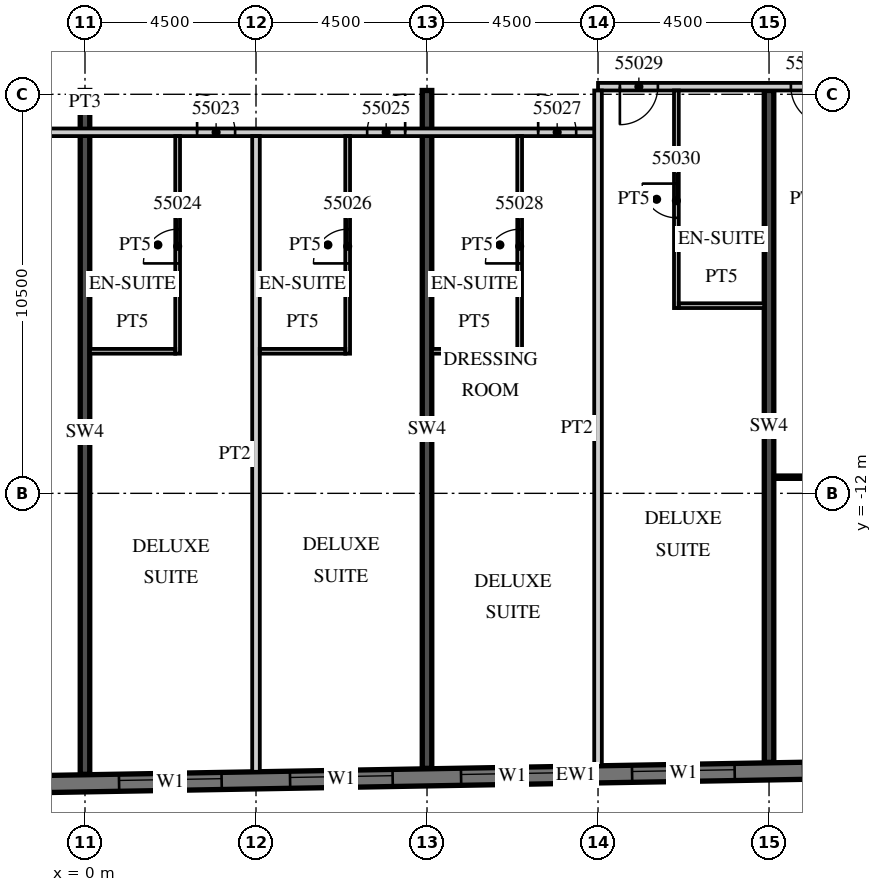
"""IFC4 building model, lengths in metres.
Left out: names, types, materials, properties, quantities, classifications, styles, units other than length and angle.
Written with IfcOpenShell. Run it as: python <this file> out.ifc"""

import sys

from ifc_helpers import new_model, si_unit, direction, frame, frame_2d, origin, place, context, subcontext, project, spatial, rectangle, extrude, element, fill, save


model = new_model("IFC4")
c1 = context("Model", 3, precision=1e-05, world=origin(), true_north=direction((0.0, 1.0)))
c2 = subcontext(c1, "Body", "Model", "MODEL_VIEW")
j1 = project(units=[si_unit("LENGTHUNIT", "METRE"), si_unit("PLANEANGLEUNIT", "RADIAN")], contexts=[c1])
p1 = place(None, origin())
s1 = spatial("IfcSite", under=j1, at=p1, CompositionType="ELEMENT")
p2 = place(p1, origin())
s2 = spatial("IfcBuilding", under=s1, at=p2, CompositionType="ELEMENT")
p3 = place(p2, frame((0.0, 0.0, 227.6)))
s3 = spatial("IfcBuildingStorey", under=s2, at=p3, CompositionType="ELEMENT", Elevation=227.6)
p4 = place(p3, frame((0.0, -19.393, 0.0), z_axis=(0.0, 0.0, 1.0), x_axis=(0.0, 1.0, 0.0)))
e1 = element("IfcWall", 1, at=p4, inside=s3, PredefinedType="SHEAR", context=c2, shape_type="SweptSolid", body=[
    extrude(rectangle(XDim=17.993, YDim=0.25, at=frame_2d((8.997, 0.0))), origin(), (0.0, 0.0, 1.0), 3.3),
])
p5 = place(p3, frame((9.0, -19.236, 0.0), z_axis=(0.0, 0.0, 1.0), x_axis=(0.0, 1.0, 0.0)))
e2 = element("IfcWall", 2, at=p5, inside=s3, PredefinedType="SHEAR", context=c2, shape_type="SweptSolid", body=[
    extrude(rectangle(XDim=17.836, YDim=0.25, at=frame_2d((8.918, 0.0))), origin(), (0.0, 0.0, 1.0), 3.3),
])
p6 = place(p3, frame((18.0, -19.079, 0.0), z_axis=(0.0, 0.0, 1.0), x_axis=(0.0, 1.0, 0.0)))
e3 = element("IfcWall", 3, at=p6, inside=s3, PredefinedType="SHEAR", context=c2, shape_type="SweptSolid", body=[
    extrude(rectangle(XDim=17.679, YDim=0.25, at=frame_2d((8.84, 0.0))), origin(), (0.0, 0.0, 1.0), 3.3),
])
p7 = place(p3, frame((-13.504, -19.866, 0.0), z_axis=(0.0, 0.0, 1.0), x_axis=(0.999847672978, 0.017453676992, 0.0)))
e4 = element("IfcWall", 4, at=p7, inside=s3, PredefinedType="SOLIDWALL", context=c2, shape_type="SweptSolid", body=[
    extrude(rectangle(XDim=52.86, YDim=0.45, at=frame_2d((26.43, 0.0))), origin(), (0.0, 0.0, 1.0), 3.02),
])
p8 = place(p7, frame((0.9, 0.0, 0.45)))
e5 = element("IfcOpeningElement", 5, at=p8, cuts=e4, PredefinedType="OPENING", context=c2, shape_type="SweptSolid", body=[
    extrude(rectangle(XDim=2.7, YDim=2.25, at=frame_2d((1.35, 1.125))), frame((0.0, 0.235, 0.0), z_axis=(0.0, -1.0, 0.0), x_axis=(1.0, 0.0, 0.0)), (0.0, 0.0, 1.0), 0.47),
])
p9 = place(p7, frame((5.401, 0.0, 0.45)))
e6 = element("IfcOpeningElement", 6, at=p9, cuts=e4, PredefinedType="OPENING", context=c2, shape_type="SweptSolid", body=[
    extrude(rectangle(XDim=2.7, YDim=2.25, at=frame_2d((1.35, 1.125))), frame((0.0, 0.235, 0.0), z_axis=(0.0, -1.0, 0.0), x_axis=(1.0, 0.0, 0.0)), (0.0, 0.0, 1.0), 0.47),
])
p10 = place(p7, frame((9.902, 0.0, 0.45)))
e7 = element("IfcOpeningElement", 7, at=p10, cuts=e4, PredefinedType="OPENING", context=c2, shape_type="SweptSolid", body=[
    extrude(rectangle(XDim=2.7, YDim=2.25, at=frame_2d((1.35, 1.125))), frame((0.0, 0.235, 0.0), z_axis=(0.0, -1.0, 0.0), x_axis=(1.0, 0.0, 0.0)), (0.0, 0.0, 1.0), 0.47),
])
p11 = place(p7, frame((14.402, 0.0, 0.45)))
e8 = element("IfcOpeningElement", 8, at=p11, cuts=e4, PredefinedType="OPENING", context=c2, shape_type="SweptSolid", body=[
    extrude(rectangle(XDim=2.7, YDim=2.25, at=frame_2d((1.35, 1.125))), frame((0.0, 0.235, 0.0), z_axis=(0.0, -1.0, 0.0), x_axis=(1.0, 0.0, 0.0)), (0.0, 0.0, 1.0), 0.47),
])
p12 = place(p7, frame((18.903, 0.0, 0.45)))
e9 = element("IfcOpeningElement", 9, at=p12, cuts=e4, PredefinedType="OPENING", context=c2, shape_type="SweptSolid", body=[
    extrude(rectangle(XDim=2.7, YDim=2.25, at=frame_2d((1.35, 1.125))), frame((0.0, 0.235, 0.0), z_axis=(0.0, -1.0, 0.0), x_axis=(1.0, 0.0, 0.0)), (0.0, 0.0, 1.0), 0.47),
])
p13 = place(p7, frame((23.404, 0.0, 0.45)))
e10 = element("IfcOpeningElement", 10, at=p13, cuts=e4, PredefinedType="OPENING", context=c2, shape_type="SweptSolid", body=[
    extrude(rectangle(XDim=2.7, YDim=2.25, at=frame_2d((1.35, 1.125))), frame((0.0, 0.235, 0.0), z_axis=(0.0, -1.0, 0.0), x_axis=(1.0, 0.0, 0.0)), (0.0, 0.0, 1.0), 0.47),
])
p14 = place(p7, frame((27.904, 0.0, 0.45)))
e11 = element("IfcOpeningElement", 11, at=p14, cuts=e4, PredefinedType="OPENING", context=c2, shape_type="SweptSolid", body=[
    extrude(rectangle(XDim=2.7, YDim=2.25, at=frame_2d((1.35, 1.125))), frame((0.0, 0.235, 0.0), z_axis=(0.0, -1.0, 0.0), x_axis=(1.0, 0.0, 0.0)), (0.0, 0.0, 1.0), 0.47),
])
p15 = place(p7, frame((32.405, 0.0, 0.45)))
e12 = element("IfcOpeningElement", 12, at=p15, cuts=e4, PredefinedType="OPENING", context=c2, shape_type="SweptSolid", body=[
    extrude(rectangle(XDim=2.7, YDim=2.25, at=frame_2d((1.35, 1.125))), frame((0.0, 0.235, 0.0), z_axis=(0.0, -1.0, 0.0), x_axis=(1.0, 0.0, 0.0)), (0.0, 0.0, 1.0), 0.47),
])
p16 = place(p7, frame((36.906, 0.0, 0.45)))
e13 = element("IfcOpeningElement", 13, at=p16, cuts=e4, PredefinedType="OPENING", context=c2, shape_type="SweptSolid", body=[
    extrude(rectangle(XDim=2.7, YDim=2.25, at=frame_2d((1.35, 1.125))), frame((0.0, 0.235, 0.0), z_axis=(0.0, -1.0, 0.0), x_axis=(1.0, 0.0, 0.0)), (0.0, 0.0, 1.0), 0.47),
])
p17 = place(p7, frame((41.406, 0.0, 0.45)))
e14 = element("IfcOpeningElement", 14, at=p17, cuts=e4, PredefinedType="OPENING", context=c2, shape_type="SweptSolid", body=[
    extrude(rectangle(XDim=2.7, YDim=2.25, at=frame_2d((1.35, 1.125))), frame((0.0, 0.235, 0.0), z_axis=(0.0, -1.0, 0.0), x_axis=(1.0, 0.0, 0.0)), (0.0, 0.0, 1.0), 0.47),
])
p18 = place(p7, frame((45.907, 0.0, 0.45)))
e15 = element("IfcOpeningElement", 15, at=p18, cuts=e4, PredefinedType="OPENING", context=c2, shape_type="SweptSolid", body=[
    extrude(rectangle(XDim=2.7, YDim=2.25, at=frame_2d((1.35, 1.125))), frame((0.0, 0.235, 0.0), z_axis=(0.0, -1.0, 0.0), x_axis=(1.0, 0.0, 0.0)), (0.0, 0.0, 1.0), 0.47),
])
p19 = place(p3, frame((-13.5, -2.5, 0.0), z_axis=(0.0, 0.0, 1.0), x_axis=(1.0, 0.0, 0.0)))
e16 = element("IfcWall", 16, at=p19, inside=s3, PredefinedType="PARTITIONING", context=c2, shape_type="SweptSolid", body=[
    extrude(rectangle(XDim=27.0, YDim=0.2, at=frame_2d((13.5, 0.0))), origin(), (0.0, 0.0, 1.0), 3.02),
])
p20 = place(p19, frame((2.925, 0.0, 0.0)))
e17 = element("IfcOpeningElement", 17, at=p20, cuts=e16, PredefinedType="OPENING", context=c2, shape_type="SweptSolid", body=[
    extrude(rectangle(XDim=1.0, YDim=2.1, at=frame_2d((0.5, 1.05))), frame((0.0, 0.11, 0.0), z_axis=(0.0, -1.0, 0.0), x_axis=(1.0, 0.0, 0.0)), (0.0, 0.0, 1.0), 0.22),
])
p21 = place(p19, frame((9.863, 0.0, 0.0)))
e18 = element("IfcOpeningElement", 18, at=p21, cuts=e16, PredefinedType="OPENING", context=c2, shape_type="SweptSolid", body=[
    extrude(rectangle(XDim=1.2, YDim=2.1, at=frame_2d((0.6, 1.05))), frame((0.0, 0.11, 0.0), z_axis=(0.0, -1.0, 0.0), x_axis=(1.0, 0.0, 0.0)), (0.0, 0.0, 1.0), 0.22),
])
p22 = place(p19, frame((16.45, 0.0, 0.0)))
e19 = element("IfcOpeningElement", 19, at=p22, cuts=e16, PredefinedType="OPENING", context=c2, shape_type="SweptSolid", body=[
    extrude(rectangle(XDim=1.0, YDim=2.1, at=frame_2d((0.5, 1.05))), frame((0.0, 0.11, 0.0), z_axis=(0.0, -1.0, 0.0), x_axis=(1.0, 0.0, 0.0)), (0.0, 0.0, 1.0), 0.22),
])
p23 = place(p19, frame((20.925, 0.0, 0.0)))
e20 = element("IfcOpeningElement", 20, at=p23, cuts=e16, PredefinedType="OPENING", context=c2, shape_type="SweptSolid", body=[
    extrude(rectangle(XDim=1.0, YDim=2.1, at=frame_2d((0.5, 1.05))), frame((0.0, 0.11, 0.0), z_axis=(0.0, -1.0, 0.0), x_axis=(1.0, 0.0, 0.0)), (0.0, 0.0, 1.0), 0.22),
])
p24 = place(p19, frame((25.425, 0.0, 0.0)))
e21 = element("IfcOpeningElement", 21, at=p24, cuts=e16, PredefinedType="OPENING", context=c2, shape_type="SweptSolid", body=[
    extrude(rectangle(XDim=1.0, YDim=2.1, at=frame_2d((0.5, 1.05))), frame((0.0, 0.11, 0.0), z_axis=(0.0, -1.0, 0.0), x_axis=(1.0, 0.0, 0.0)), (0.0, 0.0, 1.0), 0.22),
])
p25 = place(p3, frame((13.5, -1.3, 0.0), z_axis=(0.0, 0.0, 1.0), x_axis=(1.0, 0.0, 0.0)))
e22 = element("IfcWall", 22, at=p25, inside=s3, PredefinedType="PARTITIONING", context=c2, shape_type="SweptSolid", body=[
    extrude(rectangle(XDim=29.091, YDim=0.2, at=frame_2d((14.545, 0.0))), origin(), (0.0, 0.0, 1.0), 3.02),
])
p26 = place(p25, frame((0.575, 0.0, 0.0)))
e23 = element("IfcOpeningElement", 23, at=p26, cuts=e22, PredefinedType="OPENING", context=c2, shape_type="SweptSolid", body=[
    extrude(rectangle(XDim=1.0, YDim=2.1, at=frame_2d((0.5, 1.05))), frame((0.0, 0.11, 0.0), z_axis=(0.0, -1.0, 0.0), x_axis=(1.0, 0.0, 0.0)), (0.0, 0.0, 1.0), 0.22),
])
p27 = place(p25, frame((5.075, 0.0, 0.0)))
e24 = element("IfcOpeningElement", 24, at=p27, cuts=e22, PredefinedType="OPENING", context=c2, shape_type="SweptSolid", body=[
    extrude(rectangle(XDim=1.0, YDim=2.1, at=frame_2d((0.5, 1.05))), frame((0.0, 0.11, 0.0), z_axis=(0.0, -1.0, 0.0), x_axis=(1.0, 0.0, 0.0)), (0.0, 0.0, 1.0), 0.22),
])
p28 = place(p25, frame((9.55, 0.0, 0.0)))
e25 = element("IfcOpeningElement", 25, at=p28, cuts=e22, PredefinedType="OPENING", context=c2, shape_type="SweptSolid", body=[
    extrude(rectangle(XDim=1.0, YDim=2.1, at=frame_2d((0.5, 1.05))), frame((0.0, 0.11, 0.0), z_axis=(0.0, -1.0, 0.0), x_axis=(1.0, 0.0, 0.0)), (0.0, 0.0, 1.0), 0.22),
])
p29 = place(p25, frame((18.862, 0.0, 0.0)))
e26 = element("IfcOpeningElement", 26, at=p29, cuts=e22, PredefinedType="OPENING", context=c2, shape_type="SweptSolid", body=[
    extrude(rectangle(XDim=1.2, YDim=2.1, at=frame_2d((0.6, 1.05))), frame((0.0, 0.11, 0.0), z_axis=(0.0, -1.0, 0.0), x_axis=(1.0, 0.0, 0.0)), (0.0, 0.0, 1.0), 0.22),
])
p30 = place(p25, frame((23.075, 0.0, 0.0)))
e27 = element("IfcOpeningElement", 27, at=p30, cuts=e22, PredefinedType="OPENING", context=c2, shape_type="SweptSolid", body=[
    extrude(rectangle(XDim=1.0, YDim=2.1, at=frame_2d((0.5, 1.05))), frame((0.0, 0.11, 0.0), z_axis=(0.0, -1.0, 0.0), x_axis=(1.0, 0.0, 0.0)), (0.0, 0.0, 1.0), 0.22),
])
p31 = place(p25, frame((27.611, 0.0, 0.0)))
e28 = element("IfcOpeningElement", 28, at=p31, cuts=e22, PredefinedType="OPENING", context=c2, shape_type="SweptSolid", body=[
    extrude(rectangle(XDim=1.0, YDim=2.4, at=frame_2d((0.5, 1.2))), frame((0.0, 0.11, 0.0), z_axis=(0.0, -1.0, 0.0), x_axis=(1.0, 0.0, 0.0)), (0.0, 0.0, 1.0), 0.22),
])
p32 = place(p3, frame((4.5, -19.327, 0.0), z_axis=(0.0, 0.0, 1.0), x_axis=(0.0, 1.0, 0.0)))
e29 = element("IfcWall", 29, at=p32, inside=s3, PredefinedType="PARTITIONING", context=c2, shape_type="SweptSolid", body=[
    extrude(rectangle(XDim=16.727, YDim=0.2, at=frame_2d((8.363, 0.0))), origin(), (0.0, 0.0, 1.0), 3.02),
])
p33 = place(p3, frame((2.438, -8.325, 0.0), z_axis=(0.0, 0.0, 1.0), x_axis=(0.0, 1.0, 0.0)))
e30 = element("IfcWall", 30, at=p33, inside=s3, PredefinedType="PARTITIONING", context=c2, shape_type="SweptSolid", body=[
    extrude(rectangle(XDim=5.725, YDim=0.125, at=frame_2d((2.862, 0.0))), origin(), (0.0, 0.0, 1.0), 3.02),
])
p34 = place(p33, frame((2.375, 0.0, 0.0)))
e31 = element("IfcOpeningElement", 31, at=p34, cuts=e30, PredefinedType="OPENING", context=c2, shape_type="SweptSolid", body=[
    extrude(rectangle(XDim=0.9, YDim=2.1, at=frame_2d((0.45, 1.05))), frame((0.0, 0.073, 0.0), z_axis=(0.0, -1.0, 0.0), x_axis=(1.0, 0.0, 0.0)), (0.0, 0.0, 1.0), 0.145),
])
p35 = place(p3, frame((0.125, -8.262, 0.0), z_axis=(0.0, 0.0, 1.0), x_axis=(1.0, 0.0, 0.0)))
e32 = element("IfcWall", 32, at=p35, inside=s3, PredefinedType="PARTITIONING", context=c2, shape_type="SweptSolid", body=[
    extrude(rectangle(XDim=2.25, YDim=0.125, at=frame_2d((1.125, 0.0))), origin(), (0.0, 0.0, 1.0), 3.02),
])
p36 = place(p3, frame((6.912, -8.325, 0.0), z_axis=(0.0, 0.0, 1.0), x_axis=(0.0, 1.0, 0.0)))
e33 = element("IfcWall", 33, at=p36, inside=s3, PredefinedType="PARTITIONING", context=c2, shape_type="SweptSolid", body=[
    extrude(rectangle(XDim=5.725, YDim=0.125, at=frame_2d((2.862, 0.0))), origin(), (0.0, 0.0, 1.0), 3.02),
])
p37 = place(p36, frame((2.375, 0.0, 0.0)))
e34 = element("IfcOpeningElement", 34, at=p37, cuts=e33, PredefinedType="OPENING", context=c2, shape_type="SweptSolid", body=[
    extrude(rectangle(XDim=0.9, YDim=2.1, at=frame_2d((0.45, 1.05))), frame((0.0, 0.073, 0.0), z_axis=(0.0, -1.0, 0.0), x_axis=(1.0, 0.0, 0.0)), (0.0, 0.0, 1.0), 0.145),
])
p38 = place(p3, frame((4.6, -8.262, 0.0), z_axis=(0.0, 0.0, 1.0), x_axis=(1.0, 0.0, 0.0)))
e35 = element("IfcWall", 35, at=p38, inside=s3, PredefinedType="PARTITIONING", context=c2, shape_type="SweptSolid", body=[
    extrude(rectangle(XDim=2.25, YDim=0.125, at=frame_2d((1.125, 0.0))), origin(), (0.0, 0.0, 1.0), 3.02),
])
p39 = place(p3, frame((13.5, -19.17, 0.0), z_axis=(0.0, 0.0, 1.0), x_axis=(0.0, 1.0, 0.0)))
e36 = element("IfcWall", 36, at=p39, inside=s3, PredefinedType="PARTITIONING", context=c2, shape_type="SweptSolid", body=[
    extrude(rectangle(XDim=17.77, YDim=0.2, at=frame_2d((8.885, 0.0))), origin(), (0.0, 0.0, 1.0), 3.02),
])
p40 = place(p3, frame((11.438, -8.325, 0.0), z_axis=(0.0, 0.0, 1.0), x_axis=(0.0, 1.0, 0.0)))
e37 = element("IfcWall", 37, at=p40, inside=s3, PredefinedType="PARTITIONING", context=c2, shape_type="SweptSolid", body=[
    extrude(rectangle(XDim=5.725, YDim=0.125, at=frame_2d((2.862, 0.0))), origin(), (0.0, 0.0, 1.0), 3.02),
])
p41 = place(p40, frame((2.375, 0.0, 0.0)))
e38 = element("IfcOpeningElement", 38, at=p41, cuts=e37, PredefinedType="OPENING", context=c2, shape_type="SweptSolid", body=[
    extrude(rectangle(XDim=0.9, YDim=2.1, at=frame_2d((0.45, 1.05))), frame((0.0, 0.073, 0.0), z_axis=(0.0, -1.0, 0.0), x_axis=(1.0, 0.0, 0.0)), (0.0, 0.0, 1.0), 0.145),
])
p42 = place(p3, frame((9.125, -8.262, 0.0), z_axis=(0.0, 0.0, 1.0), x_axis=(1.0, 0.0, 0.0)))
e39 = element("IfcWall", 39, at=p42, inside=s3, PredefinedType="PARTITIONING", context=c2, shape_type="SweptSolid", body=[
    extrude(rectangle(XDim=2.25, YDim=0.125, at=frame_2d((1.125, 0.0))), origin(), (0.0, 0.0, 1.0), 3.02),
])
p43 = place(p3, frame((15.562, -7.125, 0.0), z_axis=(0.0, 0.0, 1.0), x_axis=(0.0, 1.0, 0.0)))
e40 = element("IfcWall", 40, at=p43, inside=s3, PredefinedType="PARTITIONING", context=c2, shape_type="SweptSolid", body=[
    extrude(rectangle(XDim=5.725, YDim=0.125, at=frame_2d((2.863, 0.0))), origin(), (0.0, 0.0, 1.0), 3.02),
])
p44 = place(p43, frame((2.375, 0.0, 0.0)))
e41 = element("IfcOpeningElement", 41, at=p44, cuts=e40, PredefinedType="OPENING", context=c2, shape_type="SweptSolid", body=[
    extrude(rectangle(XDim=0.9, YDim=2.1, at=frame_2d((0.45, 1.05))), frame((0.0, 0.073, 0.0), z_axis=(0.0, -1.0, 0.0), x_axis=(1.0, 0.0, 0.0)), (0.0, 0.0, 1.0), 0.145),
])
p45 = place(p3, frame((15.625, -7.062, 0.0), z_axis=(0.0, 0.0, 1.0), x_axis=(1.0, 0.0, 0.0)))
e42 = element("IfcWall", 42, at=p45, inside=s3, PredefinedType="PARTITIONING", context=c2, shape_type="SweptSolid", body=[
    extrude(rectangle(XDim=2.25, YDim=0.125, at=frame_2d((1.125, 0.0))), origin(), (0.0, 0.0, 1.0), 3.02),
])
p46 = place(p3, frame((18.125, -11.575, 0.0), z_axis=(0.0, 0.0, 1.0), x_axis=(1.0, 0.0, 0.0)))
e43 = element("IfcWall", 43, at=p46, inside=s3, PredefinedType="PARTITIONING", context=c2, shape_type="SweptSolid", body=[
    extrude(rectangle(XDim=4.275, YDim=0.1, at=frame_2d((2.137, 0.0))), origin(), (0.0, 0.0, 1.0), 3.02),
])
p47 = place(p46, frame((1.387, 0.0, 0.0)))
e44 = element("IfcOpeningElement", 44, at=p47, cuts=e43, PredefinedType="OPENING", context=c2, shape_type="SweptSolid", body=[
    extrude(rectangle(XDim=1.5, YDim=2.1, at=frame_2d((0.75, 1.05))), frame((0.0, 0.06, 0.0), z_axis=(0.0, -1.0, 0.0), x_axis=(1.0, 0.0, 0.0)), (0.0, 0.0, 1.0), 0.12),
])
p48 = place(p11, origin())
e45 = element("IfcWindow", 45, at=p48, inside=s3, PartitioningType="SINGLE_PANEL", PredefinedType="WINDOW", context=c2, shape_type="SweptSolid", body=[
    extrude(rectangle(XDim=2.7, YDim=2.25, at=frame_2d((1.35, 1.125))), frame((0.0, 0.09, 0.0), z_axis=(0.0, -1.0, 0.0), x_axis=(1.0, 0.0, 0.0)), (0.0, 0.0, 1.0), 0.06),
])
fill(e8, e45)
p49 = place(p12, origin())
e46 = element("IfcWindow", 46, at=p49, inside=s3, PartitioningType="SINGLE_PANEL", PredefinedType="WINDOW", context=c2, shape_type="SweptSolid", body=[
    extrude(rectangle(XDim=2.7, YDim=2.25, at=frame_2d((1.35, 1.125))), frame((0.0, 0.09, 0.0), z_axis=(0.0, -1.0, 0.0), x_axis=(1.0, 0.0, 0.0)), (0.0, 0.0, 1.0), 0.06),
])
fill(e9, e46)
p50 = place(p13, origin())
e47 = element("IfcWindow", 47, at=p50, inside=s3, PartitioningType="SINGLE_PANEL", PredefinedType="WINDOW", context=c2, shape_type="SweptSolid", body=[
    extrude(rectangle(XDim=2.7, YDim=2.25, at=frame_2d((1.35, 1.125))), frame((0.0, 0.09, 0.0), z_axis=(0.0, -1.0, 0.0), x_axis=(1.0, 0.0, 0.0)), (0.0, 0.0, 1.0), 0.06),
])
fill(e10, e47)
p51 = place(p14, origin())
e48 = element("IfcWindow", 48, at=p51, inside=s3, PartitioningType="SINGLE_PANEL", PredefinedType="WINDOW", context=c2, shape_type="SweptSolid", body=[
    extrude(rectangle(XDim=2.7, YDim=2.25, at=frame_2d((1.35, 1.125))), frame((0.0, 0.09, 0.0), z_axis=(0.0, -1.0, 0.0), x_axis=(1.0, 0.0, 0.0)), (0.0, 0.0, 1.0), 0.06),
])
fill(e11, e48)
p52 = place(p22, origin())
e49 = element("IfcDoor", 49, at=p52, inside=s3, OperationType="SINGLE_SWING_LEFT", PredefinedType="DOOR", context=c2, shape_type="SweptSolid", body=[
    extrude(rectangle(XDim=1.0, YDim=2.1, at=frame_2d((0.5, 1.05))), frame((0.0, 0.025, 0.0), z_axis=(0.0, -1.0, 0.0), x_axis=(1.0, 0.0, 0.0)), (0.0, 0.0, 1.0), 0.05),
])
fill(e19, e49)
p53 = place(p34, origin())
e50 = element("IfcDoor", 50, at=p53, inside=s3, OperationType="SINGLE_SWING_LEFT", PredefinedType="DOOR", context=c2, shape_type="SweptSolid", body=[
    extrude(rectangle(XDim=0.9, YDim=2.1, at=frame_2d((0.45, 1.05))), frame((0.0, 0.025, 0.0), z_axis=(0.0, -1.0, 0.0), x_axis=(1.0, 0.0, 0.0)), (0.0, 0.0, 1.0), 0.05),
])
fill(e31, e50)
p54 = place(p23, origin())
e51 = element("IfcDoor", 51, at=p54, inside=s3, OperationType="SINGLE_SWING_RIGHT", PredefinedType="DOOR", context=c2, shape_type="SweptSolid", body=[
    extrude(rectangle(XDim=1.0, YDim=2.1, at=frame_2d((0.5, 1.05))), frame((0.0, 0.025, 0.0), z_axis=(0.0, -1.0, 0.0), x_axis=(1.0, 0.0, 0.0)), (0.0, 0.0, 1.0), 0.05),
])
fill(e20, e51)
p55 = place(p37, origin())
e52 = element("IfcDoor", 52, at=p55, inside=s3, OperationType="SINGLE_SWING_LEFT", PredefinedType="DOOR", context=c2, shape_type="SweptSolid", body=[
    extrude(rectangle(XDim=0.9, YDim=2.1, at=frame_2d((0.45, 1.05))), frame((0.0, 0.025, 0.0), z_axis=(0.0, -1.0, 0.0), x_axis=(1.0, 0.0, 0.0)), (0.0, 0.0, 1.0), 0.05),
])
fill(e34, e52)
p56 = place(p24, origin())
e53 = element("IfcDoor", 53, at=p56, inside=s3, OperationType="SINGLE_SWING_LEFT", PredefinedType="DOOR", context=c2, shape_type="SweptSolid", body=[
    extrude(rectangle(XDim=1.0, YDim=2.1, at=frame_2d((0.5, 1.05))), frame((0.0, 0.025, 0.0), z_axis=(0.0, -1.0, 0.0), x_axis=(1.0, 0.0, 0.0)), (0.0, 0.0, 1.0), 0.05),
])
fill(e21, e53)
p57 = place(p41, origin())
e54 = element("IfcDoor", 54, at=p57, inside=s3, OperationType="SINGLE_SWING_LEFT", PredefinedType="DOOR", context=c2, shape_type="SweptSolid", body=[
    extrude(rectangle(XDim=0.9, YDim=2.1, at=frame_2d((0.45, 1.05))), frame((0.0, 0.025, 0.0), z_axis=(0.0, -1.0, 0.0), x_axis=(1.0, 0.0, 0.0)), (0.0, 0.0, 1.0), 0.05),
])
fill(e38, e54)
p58 = place(p26, origin())
e55 = element("IfcDoor", 55, at=p58, inside=s3, OperationType="SINGLE_SWING_LEFT", PredefinedType="DOOR", context=c2, shape_type="SweptSolid", body=[
    extrude(rectangle(XDim=1.0, YDim=2.1, at=frame_2d((0.5, 1.05))), frame((0.0, 0.025, 0.0), z_axis=(0.0, -1.0, 0.0), x_axis=(1.0, 0.0, 0.0)), (0.0, 0.0, 1.0), 0.05),
])
fill(e23, e55)
p59 = place(p44, origin())
e56 = element("IfcDoor", 56, at=p59, inside=s3, OperationType="SINGLE_SWING_RIGHT", PredefinedType="DOOR", context=c2, shape_type="SweptSolid", body=[
    extrude(rectangle(XDim=0.9, YDim=2.1, at=frame_2d((0.45, 1.05))), frame((0.0, 0.025, 0.0), z_axis=(0.0, -1.0, 0.0), x_axis=(1.0, 0.0, 0.0)), (0.0, 0.0, 1.0), 0.05),
])
fill(e41, e56)
p60 = place(p27, origin())
e57 = element("IfcDoor", 57, at=p60, inside=s3, OperationType="SINGLE_SWING_RIGHT", PredefinedType="DOOR", context=c2, shape_type="SweptSolid", body=[
    extrude(rectangle(XDim=1.0, YDim=2.1, at=frame_2d((0.5, 1.05))), frame((0.0, 0.025, 0.0), z_axis=(0.0, -1.0, 0.0), x_axis=(1.0, 0.0, 0.0)), (0.0, 0.0, 1.0), 0.05),
])
fill(e24, e57)
save(model, sys.argv[1])
